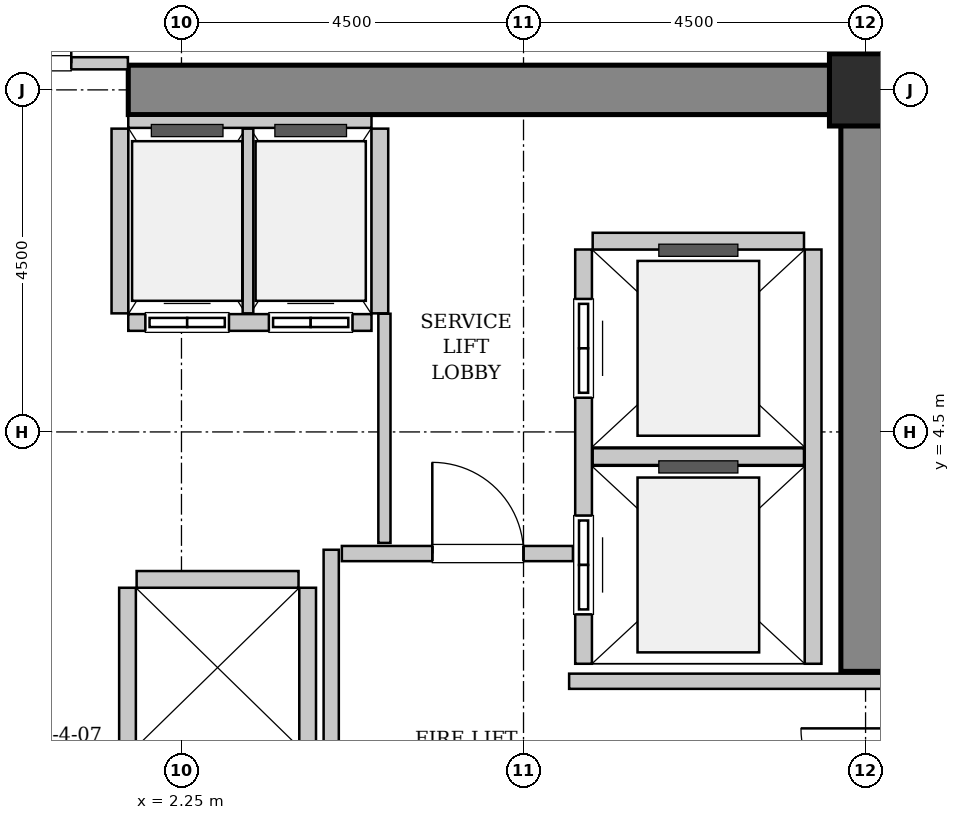
"""IFC4 building model, lengths in metres.
Left out: names, types, materials, properties, quantities, classifications, styles, units other than length and angle.
Written with IfcOpenShell. Run it as: python <this file> out.ifc"""

import sys

from ifc_helpers import new_model, si_unit, direction, frame, frame_2d, origin, origin_2d, place, context, subcontext, project, spatial, rectangle, hollow_rectangle, extrude, source, transform, mapped, element, fill, save


model = new_model("IFC4")
c1 = context("Model", 3, precision=1e-05, world=origin(), true_north=direction((0.0, 1.0)))
c2 = subcontext(c1, "Body", "Model", "MODEL_VIEW")
j1 = project(units=[si_unit("LENGTHUNIT", "METRE"), si_unit("PLANEANGLEUNIT", "RADIAN")], contexts=[c1])
p1 = place(None, origin())
s1 = spatial("IfcSite", under=j1, at=p1, CompositionType="ELEMENT")
p2 = place(p1, origin())
s2 = spatial("IfcBuilding", under=s1, at=p2, CompositionType="ELEMENT")
p3 = place(p2, frame((0.0, 0.0, 40.6)))
s3 = spatial("IfcBuildingStorey", under=s2, at=p3, CompositionType="ELEMENT", Elevation=40.6)
m1 = source(origin(), c2, "Body", "SweptSolid", [
    extrude(rectangle(XDim=10.025, YDim=0.65, at=frame_2d((5.012, 0.0))), origin(), (0.0, 0.0, 1.0), 3.8),
])
p4 = place(p3, frame((1.55, 9.0, 0.0), z_axis=(0.0, 0.0, 1.0), x_axis=(1.0, 0.0, 0.0)))
e1 = element("IfcWall", 1, at=p4, inside=s3, PredefinedType="SHEAR", context=c2, shape_type="MappedRepresentation", body=[
    mapped(m1, transform((0.0, 0.0, 0.0), x_axis=(1.0, 0.0, 0.0), y_axis=(0.0, 1.0, 0.0), z_axis=(0.0, 0.0, 1.0), scale=1.0)),
])
m2 = source(origin(), c2, "Body", "SweptSolid", [
    extrude(rectangle(XDim=7.325, YDim=0.65, at=frame_2d((3.663, 0.0))), origin(), (0.0, 0.0, 1.0), 3.8),
])
p5 = place(p3, frame((11.25, 1.35, 0.0), z_axis=(0.0, 0.0, 1.0), x_axis=(0.0, 1.0, 0.0)))
e2 = element("IfcWall", 2, at=p5, inside=s3, PredefinedType="SHEAR", context=c2, shape_type="MappedRepresentation", body=[
    mapped(m2, transform((0.0, 0.0, 0.0), x_axis=(1.0, 0.0, 0.0), y_axis=(0.0, 1.0, 0.0), z_axis=(0.0, 0.0, 1.0), scale=1.0)),
])
m3 = source(origin(), c2, "Body", "SweptSolid", [
    extrude(hollow_rectangle(XDim=0.95, YDim=0.95, WallThickness=0.045, InnerFilletRadius=0.045, OuterFilletRadius=0.09, at=origin_2d()), origin(), (0.0, 0.0, 1.0), 3.8),
])
p6 = place(p3, frame((11.25, 9.0, 0.0), z_axis=(0.0, 0.0, 1.0), x_axis=(1.0, 0.0, 0.0)))
e3 = element("IfcColumn", 3, at=p6, inside=s3, PredefinedType="COLUMN", context=c2, shape_type="MappedRepresentation", body=[
    mapped(m3, transform((0.0, 0.0, 0.0), x_axis=(1.0, 0.0, 0.0), y_axis=(0.0, 1.0, 0.0), z_axis=(0.0, 0.0, 1.0), scale=1.0)),
])
m4 = source(origin(), c2, "Body", "SweptSolid", [
    extrude(rectangle(XDim=5.45, YDim=0.22, at=frame_2d((2.725, 0.0))), origin(), (0.0, 0.0, 1.0), 3.535),
])
p7 = place(p3, frame((7.54, 6.9, 0.0), z_axis=(0.0, 0.0, 1.0), x_axis=(0.0, -1.0, 0.0)))
e4 = element("IfcWall", 4, at=p7, inside=s3, PredefinedType="SOLIDWALL", context=c2, shape_type="MappedRepresentation", body=[
    mapped(m4, transform((0.0, 0.0, 0.0), x_axis=(1.0, 0.0, 0.0), y_axis=(0.0, 1.0, 0.0), z_axis=(0.0, 0.0, 1.0), scale=1.0)),
])
p8 = place(p7, frame((3.5, 0.0, 0.0)))
e5 = element("IfcOpeningElement", 5, at=p8, cuts=e4, PredefinedType="OPENING", context=c2, shape_type="SweptSolid", body=[
    extrude(rectangle(XDim=1.3, YDim=2.3, at=frame_2d((0.65, 1.15))), frame((0.0, 0.12, 0.0), z_axis=(0.0, -1.0, 0.0), x_axis=(1.0, 0.0, 0.0)), (0.0, 0.0, 1.0), 0.24),
])
p9 = place(p7, frame((0.65, 0.0, 0.0)))
e6 = element("IfcOpeningElement", 6, at=p9, cuts=e4, PredefinedType="OPENING", context=c2, shape_type="SweptSolid", body=[
    extrude(rectangle(XDim=1.3, YDim=2.3, at=frame_2d((0.65, 1.15))), frame((0.0, 0.12, 0.0), z_axis=(0.0, -1.0, 0.0), x_axis=(1.0, 0.0, 0.0)), (0.0, 0.0, 1.0), 0.24),
])
p10 = place(p3, frame((10.56, 1.45, 0.0), z_axis=(0.0, 0.0, 1.0), x_axis=(0.0, 1.0, 0.0)))
e7 = element("IfcWall", 7, at=p10, inside=s3, PredefinedType="SOLIDWALL", context=c2, shape_type="MappedRepresentation", body=[
    mapped(m4, transform((0.0, 0.0, 0.0), x_axis=(1.0, 0.0, 0.0), y_axis=(0.0, 1.0, 0.0), z_axis=(0.0, 0.0, 1.0), scale=1.0)),
])
m5 = source(origin(), c2, "Body", "SweptSolid", [
    extrude(rectangle(XDim=2.78, YDim=0.22, at=frame_2d((1.39, 0.0))), origin(), (0.0, 0.0, 1.0), 3.535),
])
for number, where, z_axis, x_axis in (
    (8, (7.66, 4.175, 0.0), (0.0, 0.0, 1.0), (1.0, 0.0, 0.0)),
    (9, (10.44, 7.01, 0.0), (0.0, 0.0, 1.0), (-1.0, 0.0, 0.0)),
):
    element("IfcWall", number, at=place(p3, frame(where, z_axis=z_axis, x_axis=x_axis)), inside=s3, PredefinedType="SOLIDWALL", context=c2, shape_type="MappedRepresentation", body=[
        mapped(m5, transform((0.0, 0.0, 0.0), x_axis=(1.0, 0.0, 0.0), y_axis=(0.0, 1.0, 0.0), z_axis=(0.0, 0.0, 1.0), scale=1.0)),
    ])
m6 = source(origin(), c2, "Body", "SweptSolid", [
    extrude(rectangle(XDim=3.2, YDim=0.22, at=frame_2d((1.6, 0.0))), origin(), (0.0, 0.0, 1.0), 3.535),
])
p11 = place(p3, frame((1.55, 5.94, 0.0), z_axis=(0.0, 0.0, 1.0), x_axis=(1.0, 0.0, 0.0)))
e10 = element("IfcWall", 10, at=p11, inside=s3, PredefinedType="SOLIDWALL", context=c2, shape_type="MappedRepresentation", body=[
    mapped(m6, transform((0.0, 0.0, 0.0), x_axis=(1.0, 0.0, 0.0), y_axis=(0.0, 1.0, 0.0), z_axis=(0.0, 0.0, 1.0), scale=1.0)),
])
p12 = place(p11, frame((0.225, 0.0, 0.0)))
e11 = element("IfcOpeningElement", 11, at=p12, cuts=e10, PredefinedType="OPENING", context=c2, shape_type="SweptSolid", body=[
    extrude(rectangle(XDim=1.1, YDim=2.2, at=frame_2d((0.55, 1.1))), frame((0.0, 0.12, 0.0), z_axis=(0.0, -1.0, 0.0), x_axis=(1.0, 0.0, 0.0)), (0.0, 0.0, 1.0), 0.24),
])
p13 = place(p11, frame((1.85, 0.0, 0.0)))
e12 = element("IfcOpeningElement", 12, at=p13, cuts=e10, PredefinedType="OPENING", context=c2, shape_type="SweptSolid", body=[
    extrude(rectangle(XDim=1.1, YDim=2.2, at=frame_2d((0.55, 1.1))), frame((0.0, 0.12, 0.0), z_axis=(0.0, -1.0, 0.0), x_axis=(1.0, 0.0, 0.0)), (0.0, 0.0, 1.0), 0.24),
])
m7 = source(origin(), c2, "Body", "SweptSolid", [
    extrude(rectangle(XDim=3.2, YDim=0.16, at=frame_2d((1.6, 0.0))), origin(), (0.0, 0.0, 1.0), 2.425),
])
p14 = place(p3, frame((4.75, 8.58, 0.0), z_axis=(0.0, 0.0, 1.0), x_axis=(-1.0, 0.0, 0.0)))
e13 = element("IfcWall", 13, at=p14, inside=s3, PredefinedType="PARTITIONING", context=c2, shape_type="MappedRepresentation", body=[
    mapped(m7, transform((0.0, 0.0, 0.0), x_axis=(1.0, 0.0, 0.0), y_axis=(0.0, 1.0, 0.0), z_axis=(0.0, 0.0, 1.0), scale=1.0)),
])
m8 = source(origin(), c2, "Body", "SweptSolid", [
    extrude(rectangle(XDim=2.43, YDim=0.22, at=frame_2d((1.215, 0.0))), origin(), (0.0, 0.0, 1.0), 3.535),
])
p15 = place(p3, frame((1.44, 8.49, 0.0), z_axis=(0.0, 0.0, 1.0), x_axis=(0.0, -1.0, 0.0)))
e14 = element("IfcWall", 14, at=p15, inside=s3, PredefinedType="SOLIDWALL", context=c2, shape_type="MappedRepresentation", body=[
    mapped(m8, transform((0.0, 0.0, 0.0), x_axis=(1.0, 0.0, 0.0), y_axis=(0.0, 1.0, 0.0), z_axis=(0.0, 0.0, 1.0), scale=1.0)),
])
m9 = source(origin(), c2, "Body", "SweptSolid", [
    extrude(rectangle(XDim=2.43, YDim=0.14, at=frame_2d((1.215, 0.0))), origin(), (0.0, 0.0, 1.0), 3.535),
])
p16 = place(p3, frame((3.125, 6.06, 0.0), z_axis=(0.0, 0.0, 1.0), x_axis=(0.0, 1.0, 0.0)))
e15 = element("IfcWall", 15, at=p16, inside=s3, PredefinedType="PARTITIONING", context=c2, shape_type="MappedRepresentation", body=[
    mapped(m9, transform((0.0, 0.0, 0.0), x_axis=(1.0, 0.0, 0.0), y_axis=(0.0, 1.0, 0.0), z_axis=(0.0, 0.0, 1.0), scale=1.0)),
])
p17 = place(p3, frame((4.86, 6.06, 0.0), z_axis=(0.0, 0.0, 1.0), x_axis=(0.0, 1.0, 0.0)))
e16 = element("IfcWall", 16, at=p17, inside=s3, PredefinedType="SOLIDWALL", context=c2, shape_type="MappedRepresentation", body=[
    mapped(m8, transform((0.0, 0.0, 0.0), x_axis=(1.0, 0.0, 0.0), y_axis=(0.0, 1.0, 0.0), z_axis=(0.0, 0.0, 1.0), scale=1.0)),
])
m10 = source(origin(), c2, "Body", "SweptSolid", [
    extrude(rectangle(XDim=4.9, YDim=0.22, at=frame_2d((2.45, 0.0))), origin(), (0.0, 0.0, 1.0), 3.535),
])
for number, where, z_axis, x_axis in (
    (17, (1.54, 2.45, 0.0), (0.0, 0.0, 1.0), (0.0, -1.0, 0.0)),
    (18, (3.91, -2.45, 0.0), (0.0, 0.0, 1.0), (0.0, 1.0, 0.0)),
):
    element("IfcWall", number, at=place(p3, frame(where, z_axis=z_axis, x_axis=x_axis)), inside=s3, PredefinedType="SOLIDWALL", context=c2, shape_type="MappedRepresentation", body=[
        mapped(m10, transform((0.0, 0.0, 0.0), x_axis=(1.0, 0.0, 0.0), y_axis=(0.0, 1.0, 0.0), z_axis=(0.0, 0.0, 1.0), scale=1.0)),
    ])
m11 = source(origin(), c2, "Body", "SweptSolid", [
    extrude(rectangle(XDim=2.13, YDim=0.22, at=frame_2d((1.065, 0.0))), origin(), (0.0, 0.0, 1.0), 3.535),
])
p18 = place(p3, frame((3.79, 2.56, 0.0), z_axis=(0.0, 0.0, 1.0), x_axis=(-1.0, 0.0, 0.0)))
e19 = element("IfcWall", 19, at=p18, inside=s3, PredefinedType="SOLIDWALL", context=c2, shape_type="MappedRepresentation", body=[
    mapped(m11, transform((0.0, 0.0, 0.0), x_axis=(1.0, 0.0, 0.0), y_axis=(0.0, 1.0, 0.0), z_axis=(0.0, 0.0, 1.0), scale=1.0)),
])
m12 = source(origin(), c2, "Body", "SweptSolid", [
    extrude(rectangle(XDim=5.9, YDim=0.2, at=frame_2d((2.95, 0.0))), origin(), (0.0, 0.0, 1.0), 3.535),
])
p19 = place(p3, frame((4.22, -2.95, 0.0), z_axis=(0.0, 0.0, 1.0), x_axis=(0.0, 1.0, 0.0)))
e20 = element("IfcWall", 20, at=p19, inside=s3, PredefinedType="PARTITIONING", context=c2, shape_type="MappedRepresentation", body=[
    mapped(m12, transform((0.0, 0.0, 0.0), x_axis=(1.0, 0.0, 0.0), y_axis=(0.0, 1.0, 0.0), z_axis=(0.0, 0.0, 1.0), scale=1.0)),
])
m13 = source(origin(), c2, "Body", "SweptSolid", [
    extrude(rectangle(XDim=3.04, YDim=0.2, at=frame_2d((1.52, 0.0))), origin(), (0.0, 0.0, 1.0), 3.535),
])
p20 = place(p3, frame((4.36, 2.9, 0.0), z_axis=(0.0, 0.0, 1.0), x_axis=(1.0, 0.0, 0.0)))
e21 = element("IfcWall", 21, at=p20, inside=s3, PredefinedType="PARTITIONING", context=c2, shape_type="MappedRepresentation", body=[
    mapped(m13, transform((0.0, 0.0, 0.0), x_axis=(1.0, 0.0, 0.0), y_axis=(0.0, 1.0, 0.0), z_axis=(0.0, 0.0, 1.0), scale=1.0)),
])
p21 = place(p20, frame((1.19, 0.0, 0.0)))
e22 = element("IfcOpeningElement", 22, at=p21, cuts=e21, PredefinedType="OPENING", context=c2, shape_type="SweptSolid", body=[
    extrude(rectangle(XDim=1.2, YDim=2.15, at=frame_2d((0.6, 1.075))), frame((0.0, 0.11, 0.0), z_axis=(0.0, -1.0, 0.0), x_axis=(1.0, 0.0, 0.0)), (0.0, 0.0, 1.0), 0.22),
])
m14 = source(origin(), c2, "Body", "SweptSolid", [
    extrude(rectangle(XDim=4.11, YDim=0.2, at=frame_2d((2.055, 0.0))), origin(), (0.0, 0.0, 1.0), 3.535),
])
p22 = place(p3, frame((7.35, 1.22, 0.0), z_axis=(0.0, 0.0, 1.0), x_axis=(1.0, 0.0, 0.0)))
e23 = element("IfcWall", 23, at=p22, inside=s3, PredefinedType="PARTITIONING", context=c2, shape_type="MappedRepresentation", body=[
    mapped(m14, transform((0.0, 0.0, 0.0), x_axis=(1.0, 0.0, 0.0), y_axis=(0.0, 1.0, 0.0), z_axis=(0.0, 0.0, 1.0), scale=1.0)),
])
m15 = source(origin(), c2, "Body", "SweptSolid", [
    extrude(rectangle(XDim=3.09, YDim=0.16, at=frame_2d((1.545, 0.0))), origin(), (0.0, 0.0, 1.0), 2.425),
])
p23 = place(p3, frame((-1.545, 9.35, 0.0), z_axis=(0.0, 0.0, 1.0), x_axis=(1.0, 0.0, 0.0)))
e24 = element("IfcWall", 24, at=p23, inside=s3, PredefinedType="PARTITIONING", context=c2, shape_type="MappedRepresentation", body=[
    mapped(m15, transform((0.0, 0.0, 0.0), x_axis=(1.0, 0.0, 0.0), y_axis=(0.0, 1.0, 0.0), z_axis=(0.0, 0.0, 1.0), scale=1.0)),
])
p24 = place(p23, frame((0.745, 0.0, 0.0)))
e25 = element("IfcOpeningElement", 25, at=p24, cuts=e24, PredefinedType="OPENING", context=c2, shape_type="SweptSolid", body=[
    extrude(rectangle(XDim=1.6, YDim=2.3, at=frame_2d((0.8, 1.15))), frame((0.0, 0.09, 0.0), z_axis=(0.0, -1.0, 0.0), x_axis=(1.0, 0.0, 0.0)), (0.0, 0.0, 1.0), 0.18),
])
m16 = source(origin(), c2, "Body", "SweptSolid", [
    extrude(rectangle(XDim=3.015, YDim=0.16, at=frame_2d((1.507, 0.0))), origin(), (0.0, 0.0, 1.0), 3.535),
])
p25 = place(p3, frame((4.92, 3.04, 0.0), z_axis=(0.0, 0.0, 1.0), x_axis=(0.0, 1.0, 0.0)))
e26 = element("IfcWall", 26, at=p25, inside=s3, PredefinedType="PARTITIONING", context=c2, shape_type="MappedRepresentation", body=[
    mapped(m16, transform((0.0, 0.0, 0.0), x_axis=(1.0, 0.0, 0.0), y_axis=(0.0, 1.0, 0.0), z_axis=(0.0, 0.0, 1.0), scale=1.0)),
])
m17 = source(origin(), c2, "Body", "SweptSolid", [
    extrude(rectangle(XDim=1.3, YDim=2.3, at=frame_2d((0.65, 1.15))), frame((0.0, 0.025, 0.0), z_axis=(0.0, -1.0, 0.0), x_axis=(1.0, 0.0, 0.0)), (0.0, 0.0, 1.0), 0.05),
])
p26 = place(p8, origin())
e27 = element("IfcDoor", 27, at=p26, inside=s3, OperationType="SLIDING_TO_RIGHT", PredefinedType="DOOR", context=c2, shape_type="MappedRepresentation", body=[
    mapped(m17, transform((0.0, 0.0, 0.0), x_axis=(1.0, 0.0, 0.0), y_axis=(0.0, 1.0, 0.0), z_axis=(0.0, 0.0, 1.0), scale=1.0)),
])
fill(e5, e27)
p27 = place(p9, origin())
e28 = element("IfcDoor", 28, at=p27, inside=s3, OperationType="SLIDING_TO_RIGHT", PredefinedType="DOOR", context=c2, shape_type="MappedRepresentation", body=[
    mapped(m17, transform((0.0, 0.0, 0.0), x_axis=(1.0, 0.0, 0.0), y_axis=(0.0, 1.0, 0.0), z_axis=(0.0, 0.0, 1.0), scale=1.0)),
])
fill(e6, e28)
m18 = source(origin(), c2, "Body", "SweptSolid", [
    extrude(rectangle(XDim=1.1, YDim=2.2, at=frame_2d((0.55, 1.1))), frame((0.0, 0.025, 0.0), z_axis=(0.0, -1.0, 0.0), x_axis=(1.0, 0.0, 0.0)), (0.0, 0.0, 1.0), 0.05),
])
p28 = place(p12, origin())
e29 = element("IfcDoor", 29, at=p28, inside=s3, OperationType="DOUBLE_DOOR_SLIDING", PredefinedType="DOOR", context=c2, shape_type="MappedRepresentation", body=[
    mapped(m18, transform((0.0, 0.0, 0.0), x_axis=(1.0, 0.0, 0.0), y_axis=(0.0, 1.0, 0.0), z_axis=(0.0, 0.0, 1.0), scale=1.0)),
])
fill(e11, e29)
p29 = place(p13, origin())
e30 = element("IfcDoor", 30, at=p29, inside=s3, OperationType="DOUBLE_DOOR_SLIDING", PredefinedType="DOOR", context=c2, shape_type="MappedRepresentation", body=[
    mapped(m18, transform((0.0, 0.0, 0.0), x_axis=(1.0, 0.0, 0.0), y_axis=(0.0, 1.0, 0.0), z_axis=(0.0, 0.0, 1.0), scale=1.0)),
])
fill(e12, e30)
m19 = source(origin(), c2, "Body", "SweptSolid", [
    extrude(rectangle(XDim=1.2, YDim=2.15, at=frame_2d((0.6, 1.075))), frame((0.0, 0.025, 0.0), z_axis=(0.0, -1.0, 0.0), x_axis=(1.0, 0.0, 0.0)), (0.0, 0.0, 1.0), 0.05),
])
p30 = place(p21, origin())
e31 = element("IfcDoor", 31, at=p30, inside=s3, OperationType="SINGLE_SWING_LEFT", PredefinedType="DOOR", context=c2, shape_type="MappedRepresentation", body=[
    mapped(m19, transform((0.0, 0.0, 0.0), x_axis=(1.0, 0.0, 0.0), y_axis=(0.0, 1.0, 0.0), z_axis=(0.0, 0.0, 1.0), scale=1.0)),
])
fill(e22, e31)
m20 = source(origin(), c2, "Body", "SweptSolid", [
    extrude(rectangle(XDim=1.6, YDim=2.3, at=frame_2d((0.8, 1.15))), frame((0.0, 0.025, 0.0), z_axis=(0.0, -1.0, 0.0), x_axis=(1.0, 0.0, 0.0)), (0.0, 0.0, 1.0), 0.05),
])
p31 = place(p24, origin())
e32 = element("IfcDoor", 32, at=p31, inside=s3, OperationType="DOUBLE_DOOR_SINGLE_SWING", PredefinedType="DOOR", context=c2, shape_type="MappedRepresentation", body=[
    mapped(m20, transform((0.0, 0.0, 0.0), x_axis=(1.0, 0.0, 0.0), y_axis=(0.0, 1.0, 0.0), z_axis=(0.0, 0.0, 1.0), scale=1.0)),
])
fill(e25, e32)
save(model, sys.argv[1])
